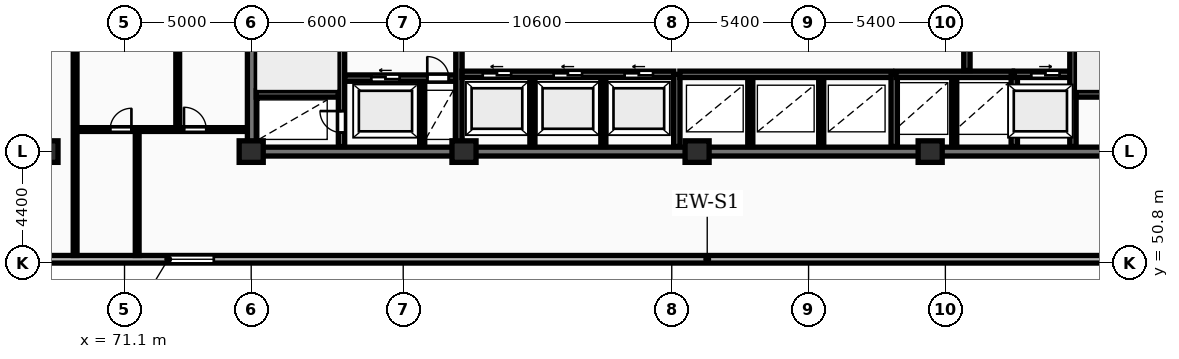
"""IFC4 building model, lengths in metres.
Left out: names, types, materials, properties, quantities, classifications, styles, units other than length and angle.
Written with IfcOpenShell. Run it as: python <this file> out.ifc"""

import sys

from ifc_helpers import new_model, si_unit, direction, frame, frame_2d, origin, origin_2d, place, context, subcontext, project, spatial, rectangle, extrude, element, fill, save


model = new_model("IFC4")
c1 = context("Model", 3, precision=1e-05, world=origin(), true_north=direction((0.0, 1.0)))
c2 = subcontext(c1, "Body", "Model", "MODEL_VIEW")
j1 = project(units=[si_unit("LENGTHUNIT", "METRE"), si_unit("PLANEANGLEUNIT", "RADIAN")], contexts=[c1])
p1 = place(None, origin())
s1 = spatial("IfcSite", under=j1, at=p1, CompositionType="ELEMENT")
p2 = place(p1, origin())
s2 = spatial("IfcBuilding", under=s1, at=p2, CompositionType="ELEMENT")
p3 = place(p2, frame((0.0, 0.0, 80.8)))
s3 = spatial("IfcBuildingStorey", under=s2, at=p3, CompositionType="ELEMENT", Elevation=80.8)
for number, where, z_axis, x_axis in (
    (1, (68.0, 55.2, 0.0), (0.0, 0.0, 1.0), (1.0, 0.0, 0.0)),
    (2, (76.1, 55.2, 0.0), (0.0, 0.0, 1.0), (1.0, 0.0, 0.0)),
    (3, (84.5, 55.2, 0.0), (0.0, 0.0, 1.0), (1.0, 0.0, 0.0)),
    (4, (93.7, 55.2, 0.0), (0.0, 0.0, 1.0), (1.0, 0.0, 0.0)),
    (5, (102.9, 55.2, 0.0), (0.0, 0.0, 1.0), (1.0, 0.0, 0.0)),
):
    element("IfcColumn", number, at=place(p3, frame(where, z_axis=z_axis, x_axis=x_axis)), inside=s3, PredefinedType="COLUMN", context=c2, shape_type="SweptSolid", body=[
        extrude(rectangle(XDim=0.95, YDim=0.85, at=origin_2d()), origin(), (0.0, 0.0, 1.0), 3.25),
    ])
p4 = place(p3, frame((57.6, 50.95, 0.0), z_axis=(0.0, 0.0, 1.0), x_axis=(1.0, 0.0, 0.0)))
e6 = element("IfcWall", 6, at=p4, inside=s3, PredefinedType="STANDARD", context=c2, shape_type="SweptSolid", body=[
    extrude(rectangle(XDim=73.0, YDim=0.3, at=frame_2d((36.5, 0.0))), origin(), (0.0, 0.0, 1.0), 2.97),
])
p5 = place(p4, frame((15.225, 0.0, 0.85)))
e7 = element("IfcOpeningElement", 7, at=p5, cuts=e6, PredefinedType="OPENING", context=c2, shape_type="SweptSolid", body=[
    extrude(rectangle(XDim=1.8, YDim=1.8, at=frame_2d((0.9, 0.9))), frame((0.0, 0.16, 0.0), z_axis=(0.0, -1.0, 0.0), x_axis=(1.0, 0.0, 0.0)), (0.0, 0.0, 1.0), 0.32),
])
p6 = place(p4, frame((58.575, 0.0, 0.85)))
e8 = element("IfcOpeningElement", 8, at=p6, cuts=e6, PredefinedType="OPENING", context=c2, shape_type="SweptSolid", body=[
    extrude(rectangle(XDim=1.8, YDim=1.8, at=frame_2d((0.9, 0.9))), frame((0.0, 0.16, 0.0), z_axis=(0.0, -1.0, 0.0), x_axis=(1.0, 0.0, 0.0)), (0.0, 0.0, 1.0), 0.32),
])
p7 = place(p3, frame((75.95, 55.2, 0.0), z_axis=(0.0, 0.0, 1.0), x_axis=(1.0, 0.0, 0.0)))
e9 = element("IfcWall", 9, at=p7, inside=s3, PredefinedType="SHEAR", context=c2, shape_type="SweptSolid", body=[
    extrude(rectangle(XDim=36.3, YDim=0.35, at=frame_2d((18.15, 0.0))), origin(), (0.0, 0.0, 1.0), 3.25),
])
p8 = place(p3, frame((76.125, 55.375, 0.0), z_axis=(0.0, 0.0, 1.0), x_axis=(0.0, 1.0, 0.0)))
e10 = element("IfcWall", 10, at=p8, inside=s3, PredefinedType="SHEAR", context=c2, shape_type="SweptSolid", body=[
    extrude(rectangle(XDim=11.65, YDim=0.35, at=frame_2d((5.825, 0.0))), origin(), (0.0, 0.0, 1.0), 3.25),
])
p9 = place(p3, frame((79.665, 55.4, 0.0), z_axis=(0.0, 0.0, 1.0), x_axis=(0.0, 1.0, 0.0)))
e11 = element("IfcWall", 11, at=p9, inside=s3, PredefinedType="SHEAR", context=c2, shape_type="SweptSolid", body=[
    extrude(rectangle(XDim=11.6, YDim=0.25, at=frame_2d((5.8, 0.0))), origin(), (0.0, 0.0, 1.0), 3.25),
])
p10 = place(p9, frame((0.55, 0.0, 0.0)))
e12 = element("IfcOpeningElement", 12, at=p10, cuts=e11, PredefinedType="OPENING", context=c2, shape_type="SweptSolid", body=[
    extrude(rectangle(XDim=0.85, YDim=2.05, at=frame_2d((0.425, 1.025))), frame((0.0, 0.135, 0.0), z_axis=(0.0, -1.0, 0.0), x_axis=(1.0, 0.0, 0.0)), (0.0, 0.0, 1.0), 0.27),
])
p11 = place(p9, frame((8.4, 0.0, 0.0)))
e13 = element("IfcOpeningElement", 13, at=p11, cuts=e11, PredefinedType="OPENING", context=c2, shape_type="SweptSolid", body=[
    extrude(rectangle(XDim=1.1, YDim=2.1, at=frame_2d((0.55, 1.05))), frame((0.0, 0.135, 0.0), z_axis=(0.0, -1.0, 0.0), x_axis=(1.0, 0.0, 0.0)), (0.0, 0.0, 1.0), 0.27),
])
p12 = place(p9, frame((10.25, 0.0, 0.0)))
e14 = element("IfcOpeningElement", 14, at=p12, cuts=e11, PredefinedType="OPENING", context=c2, shape_type="SweptSolid", body=[
    extrude(rectangle(XDim=0.85, YDim=2.05, at=frame_2d((0.425, 1.025))), frame((0.0, 0.135, 0.0), z_axis=(0.0, -1.0, 0.0), x_axis=(1.0, 0.0, 0.0)), (0.0, 0.0, 1.0), 0.27),
])
p13 = place(p3, frame((76.3, 57.475, 0.0), z_axis=(0.0, 0.0, 1.0), x_axis=(1.0, 0.0, 0.0)))
e15 = element("IfcWall", 15, at=p13, inside=s3, PredefinedType="SHEAR", context=c2, shape_type="SweptSolid", body=[
    extrude(rectangle(XDim=3.24, YDim=0.25, at=frame_2d((1.62, 0.0))), origin(), (0.0, 0.0, 1.0), 3.25),
])
p14 = place(p3, frame((79.79, 58.1, 0.0), z_axis=(0.0, 0.0, 1.0), x_axis=(1.0, 0.0, 0.0)))
e16 = element("IfcWall", 16, at=p14, inside=s3, PredefinedType="SHEAR", context=c2, shape_type="SweptSolid", body=[
    extrude(rectangle(XDim=4.39, YDim=0.25, at=frame_2d((2.195, 0.0))), origin(), (0.0, 0.0, 1.0), 3.25),
])
p15 = place(p14, frame((1.05, 0.0, 0.0)))
e17 = element("IfcOpeningElement", 17, at=p15, cuts=e16, PredefinedType="OPENING", context=c2, shape_type="SweptSolid", body=[
    extrude(rectangle(XDim=1.12, YDim=2.12, at=frame_2d((0.56, 1.06))), frame((0.0, 0.135, 0.0), z_axis=(0.0, -1.0, 0.0), x_axis=(1.0, 0.0, 0.0)), (0.0, 0.0, 1.0), 0.27),
])
p16 = place(p14, frame((3.26, 0.0, 0.0)))
e18 = element("IfcOpeningElement", 18, at=p16, cuts=e16, PredefinedType="OPENING", context=c2, shape_type="SweptSolid", body=[
    extrude(rectangle(XDim=0.85, YDim=2.05, at=frame_2d((0.425, 1.025))), frame((0.0, 0.135, 0.0), z_axis=(0.0, -1.0, 0.0), x_axis=(1.0, 0.0, 0.0)), (0.0, 0.0, 1.0), 0.27),
])
p17 = place(p3, frame((82.85, 55.4, 0.0), z_axis=(0.0, 0.0, 1.0), x_axis=(0.0, 1.0, 0.0)))
e19 = element("IfcWall", 19, at=p17, inside=s3, PredefinedType="PARTITIONING", context=c2, shape_type="SweptSolid", body=[
    extrude(rectangle(XDim=2.56, YDim=0.2, at=frame_2d((1.28, 0.0))), origin(), (0.0, 0.0, 1.0), 2.97),
])
p18 = place(p3, frame((84.3, 55.4, 0.0), z_axis=(0.0, 0.0, 1.0), x_axis=(0.0, 1.0, 0.0)))
e20 = element("IfcWall", 20, at=p18, inside=s3, PredefinedType="SHEAR", context=c2, shape_type="SweptSolid", body=[
    extrude(rectangle(XDim=11.6, YDim=0.25, at=frame_2d((5.8, 0.0))), origin(), (0.0, 0.0, 1.0), 3.25),
])
p19 = place(p18, frame((5.2, 0.0, 0.0)))
e21 = element("IfcOpeningElement", 21, at=p19, cuts=e20, PredefinedType="OPENING", context=c2, shape_type="SweptSolid", body=[
    extrude(rectangle(XDim=1.1, YDim=2.1, at=frame_2d((0.55, 1.05))), frame((0.0, 0.135, 0.0), z_axis=(0.0, -1.0, 0.0), x_axis=(1.0, 0.0, 0.0)), (0.0, 0.0, 1.0), 0.27),
])
for number, where, z_axis, x_axis in (
    (22, (87.2, 55.4, 0.0), (0.0, 0.0, 1.0), (0.0, 1.0, 0.0)),
    (23, (90.0, 55.4, 0.0), (0.0, 0.0, 1.0), (0.0, 1.0, 0.0)),
):
    element("IfcWall", number, at=place(p3, frame(where, z_axis=z_axis, x_axis=x_axis)), inside=s3, PredefinedType="PARTITIONING", context=c2, shape_type="SweptSolid", body=[
        extrude(rectangle(XDim=2.72, YDim=0.2, at=frame_2d((1.36, 0.0))), origin(), (0.0, 0.0, 1.0), 2.97),
    ])
p20 = place(p3, frame((84.42, 58.25, 0.0), z_axis=(0.0, 0.0, 1.0), x_axis=(1.0, 0.0, 0.0)))
e24 = element("IfcWall", 24, at=p20, inside=s3, PredefinedType="SHEAR", context=c2, shape_type="SweptSolid", body=[
    extrude(rectangle(XDim=8.36, YDim=0.25, at=frame_2d((4.18, 0.0))), origin(), (0.0, 0.0, 1.0), 3.25),
])
p21 = place(p20, frame((0.82, 0.0, 0.0)))
e25 = element("IfcOpeningElement", 25, at=p21, cuts=e24, PredefinedType="OPENING", context=c2, shape_type="SweptSolid", body=[
    extrude(rectangle(XDim=1.12, YDim=2.12, at=frame_2d((0.56, 1.06))), frame((0.0, 0.135, 0.0), z_axis=(0.0, -1.0, 0.0), x_axis=(1.0, 0.0, 0.0)), (0.0, 0.0, 1.0), 0.27),
])
p22 = place(p20, frame((3.62, 0.0, 0.0)))
e26 = element("IfcOpeningElement", 26, at=p22, cuts=e24, PredefinedType="OPENING", context=c2, shape_type="SweptSolid", body=[
    extrude(rectangle(XDim=1.12, YDim=2.12, at=frame_2d((0.56, 1.06))), frame((0.0, 0.135, 0.0), z_axis=(0.0, -1.0, 0.0), x_axis=(1.0, 0.0, 0.0)), (0.0, 0.0, 1.0), 0.27),
])
p23 = place(p20, frame((6.42, 0.0, 0.0)))
e27 = element("IfcOpeningElement", 27, at=p23, cuts=e24, PredefinedType="OPENING", context=c2, shape_type="SweptSolid", body=[
    extrude(rectangle(XDim=1.12, YDim=2.12, at=frame_2d((0.56, 1.06))), frame((0.0, 0.135, 0.0), z_axis=(0.0, -1.0, 0.0), x_axis=(1.0, 0.0, 0.0)), (0.0, 0.0, 1.0), 0.27),
])
p24 = place(p3, frame((92.9, 55.4, 0.0), z_axis=(0.0, 0.0, 1.0), x_axis=(0.0, 1.0, 0.0)))
e28 = element("IfcWall", 28, at=p24, inside=s3, PredefinedType="SHEAR", context=c2, shape_type="SweptSolid", body=[
    extrude(rectangle(XDim=2.85, YDim=0.25, at=frame_2d((1.425, 0.0))), origin(), (0.0, 0.0, 1.0), 3.25),
])
for number, where, z_axis, x_axis in (
    (29, (95.8, 55.4, 0.0), (0.0, 0.0, 1.0), (0.0, 1.0, 0.0)),
    (30, (98.6, 55.4, 0.0), (0.0, 0.0, 1.0), (0.0, 1.0, 0.0)),
):
    element("IfcWall", number, at=place(p3, frame(where, z_axis=z_axis, x_axis=x_axis)), inside=s3, PredefinedType="PARTITIONING", context=c2, shape_type="SweptSolid", body=[
        extrude(rectangle(XDim=2.72, YDim=0.2, at=frame_2d((1.36, 0.0))), origin(), (0.0, 0.0, 1.0), 2.97),
    ])
p25 = place(p3, frame((93.02, 58.25, 0.0), z_axis=(0.0, 0.0, 1.0), x_axis=(1.0, 0.0, 0.0)))
e31 = element("IfcWall", 31, at=p25, inside=s3, PredefinedType="SHEAR", context=c2, shape_type="SweptSolid", body=[
    extrude(rectangle(XDim=8.36, YDim=0.25, at=frame_2d((4.18, 0.0))), origin(), (0.0, 0.0, 1.0), 3.25),
])
p26 = place(p3, frame((101.48, 55.4, 0.0), z_axis=(0.0, 0.0, 1.0), x_axis=(0.0, 1.0, 0.0)))
e32 = element("IfcWall", 32, at=p26, inside=s3, PredefinedType="SHEAR", context=c2, shape_type="SweptSolid", body=[
    extrude(rectangle(XDim=2.85, YDim=0.25, at=frame_2d((1.425, 0.0))), origin(), (0.0, 0.0, 1.0), 3.25),
])
p27 = place(p3, frame((103.85, 55.4, 0.0), z_axis=(0.0, 0.0, 1.0), x_axis=(0.0, 1.0, 0.0)))
e33 = element("IfcWall", 33, at=p27, inside=s3, PredefinedType="PARTITIONING", context=c2, shape_type="SweptSolid", body=[
    extrude(rectangle(XDim=2.72, YDim=0.2, at=frame_2d((1.36, 0.0))), origin(), (0.0, 0.0, 1.0), 2.97),
])
p28 = place(p3, frame((101.55, 58.25, 0.0), z_axis=(0.0, 0.0, 1.0), x_axis=(1.0, 0.0, 0.0)))
e34 = element("IfcWall", 34, at=p28, inside=s3, PredefinedType="SHEAR", context=c2, shape_type="SweptSolid", body=[
    extrude(rectangle(XDim=4.6, YDim=0.25, at=frame_2d((2.3, 0.0))), origin(), (0.0, 0.0, 1.0), 3.25),
])
p29 = place(p3, frame((106.22, 55.4, 0.0), z_axis=(0.0, 0.0, 1.0), x_axis=(0.0, 1.0, 0.0)))
e35 = element("IfcWall", 35, at=p29, inside=s3, PredefinedType="SHEAR", context=c2, shape_type="SweptSolid", body=[
    extrude(rectangle(XDim=2.85, YDim=0.25, at=frame_2d((1.425, 0.0))), origin(), (0.0, 0.0, 1.0), 3.25),
])
p30 = place(p3, frame((106.22, 58.25, 0.0), z_axis=(0.0, 0.0, 1.0), x_axis=(1.0, 0.0, 0.0)))
e36 = element("IfcWall", 36, at=p30, inside=s3, PredefinedType="SHEAR", context=c2, shape_type="SweptSolid", body=[
    extrude(rectangle(XDim=2.46, YDim=0.25, at=frame_2d((1.23, 0.0))), origin(), (0.0, 0.0, 1.0), 3.25),
])
p31 = place(p30, frame((0.67, 0.0, 0.0)))
e37 = element("IfcOpeningElement", 37, at=p31, cuts=e36, PredefinedType="OPENING", context=c2, shape_type="SweptSolid", body=[
    extrude(rectangle(XDim=1.12, YDim=2.12, at=frame_2d((0.56, 1.06))), frame((0.0, 0.135, 0.0), z_axis=(0.0, -1.0, 0.0), x_axis=(1.0, 0.0, 0.0)), (0.0, 0.0, 1.0), 0.27),
])
p32 = place(p3, frame((104.35, 58.4, 0.0), z_axis=(0.0, 0.0, 1.0), x_axis=(0.0, 1.0, 0.0)))
e38 = element("IfcWall", 38, at=p32, inside=s3, PredefinedType="SHEAR", context=c2, shape_type="SweptSolid", body=[
    extrude(rectangle(XDim=8.6, YDim=0.25, at=frame_2d((4.3, 0.0))), origin(), (0.0, 0.0, 1.0), 3.25),
])
p33 = place(p32, frame((1.8, 0.0, 0.0)))
e39 = element("IfcOpeningElement", 39, at=p33, cuts=e38, PredefinedType="OPENING", context=c2, shape_type="SweptSolid", body=[
    extrude(rectangle(XDim=1.1, YDim=2.1, at=frame_2d((0.55, 1.05))), frame((0.0, 0.135, 0.0), z_axis=(0.0, -1.0, 0.0), x_axis=(1.0, 0.0, 0.0)), (0.0, 0.0, 1.0), 0.27),
])
p34 = place(p3, frame((108.535, 55.4, 0.0), z_axis=(0.0, 0.0, 1.0), x_axis=(0.0, 1.0, 0.0)))
e40 = element("IfcWall", 40, at=p34, inside=s3, PredefinedType="SHEAR", context=c2, shape_type="SweptSolid", body=[
    extrude(rectangle(XDim=11.6, YDim=0.25, at=frame_2d((5.8, 0.0))), origin(), (0.0, 0.0, 1.0), 3.25),
])
p35 = place(p34, frame((8.2, 0.0, 0.0)))
e41 = element("IfcOpeningElement", 41, at=p35, cuts=e40, PredefinedType="OPENING", context=c2, shape_type="SweptSolid", body=[
    extrude(rectangle(XDim=1.1, YDim=2.1, at=frame_2d((0.55, 1.05))), frame((0.0, 0.135, 0.0), z_axis=(0.0, -1.0, 0.0), x_axis=(1.0, 0.0, 0.0)), (0.0, 0.0, 1.0), 0.27),
])
p36 = place(p34, frame((10.25, 0.0, 0.0)))
e42 = element("IfcOpeningElement", 42, at=p36, cuts=e40, PredefinedType="OPENING", context=c2, shape_type="SweptSolid", body=[
    extrude(rectangle(XDim=0.85, YDim=2.05, at=frame_2d((0.425, 1.025))), frame((0.0, 0.135, 0.0), z_axis=(0.0, -1.0, 0.0), x_axis=(1.0, 0.0, 0.0)), (0.0, 0.0, 1.0), 0.27),
])
p37 = place(p3, frame((108.66, 57.475, 0.0), z_axis=(0.0, 0.0, 1.0), x_axis=(1.0, 0.0, 0.0)))
e43 = element("IfcWall", 43, at=p37, inside=s3, PredefinedType="SHEAR", context=c2, shape_type="SweptSolid", body=[
    extrude(rectangle(XDim=3.24, YDim=0.25, at=frame_2d((1.62, 0.0))), origin(), (0.0, 0.0, 1.0), 3.25),
])
p38 = place(p3, frame((69.15, 51.1, 0.0), z_axis=(0.0, 0.0, 1.0), x_axis=(0.0, 1.0, 0.0)))
e44 = element("IfcWall", 44, at=p38, inside=s3, PredefinedType="PARTITIONING", context=c2, shape_type="SweptSolid", body=[
    extrude(rectangle(XDim=16.05, YDim=0.15, at=frame_2d((8.025, 0.0))), origin(), (0.0, 0.0, 1.0), 2.97),
])
p39 = place(p38, frame((11.3, 0.0, 0.0)))
e45 = element("IfcOpeningElement", 45, at=p39, cuts=e44, PredefinedType="OPENING", context=c2, shape_type="SweptSolid", body=[
    extrude(rectangle(XDim=0.88, YDim=2.06, at=frame_2d((0.44, 1.03))), frame((0.0, 0.085, 0.0), z_axis=(0.0, -1.0, 0.0), x_axis=(1.0, 0.0, 0.0)), (0.0, 0.0, 1.0), 0.17),
])
p40 = place(p3, frame((73.2, 56.07, 0.0), z_axis=(0.0, 0.0, 1.0), x_axis=(0.0, 1.0, 0.0)))
e46 = element("IfcWall", 46, at=p40, inside=s3, PredefinedType="PARTITIONING", context=c2, shape_type="SweptSolid", body=[
    extrude(rectangle(XDim=11.08, YDim=0.15, at=frame_2d((5.54, 0.0))), origin(), (0.0, 0.0, 1.0), 2.97),
])
p41 = place(p40, frame((5.08, 0.0, 0.0)))
e47 = element("IfcOpeningElement", 47, at=p41, cuts=e46, PredefinedType="OPENING", context=c2, shape_type="SweptSolid", body=[
    extrude(rectangle(XDim=0.92, YDim=2.08, at=frame_2d((0.46, 1.04))), frame((0.0, 0.085, 0.0), z_axis=(0.0, -1.0, 0.0), x_axis=(1.0, 0.0, 0.0)), (0.0, 0.0, 1.0), 0.17),
])
p42 = place(p3, frame((71.6, 51.1, 0.0), z_axis=(0.0, 0.0, 1.0), x_axis=(0.0, 1.0, 0.0)))
e48 = element("IfcWall", 48, at=p42, inside=s3, PredefinedType="PARTITIONING", context=c2, shape_type="SweptSolid", body=[
    extrude(rectangle(XDim=4.97, YDim=0.15, at=frame_2d((2.485, 0.0))), origin(), (0.0, 0.0, 1.0), 2.97),
])
p43 = place(p3, frame((69.17, 56.07, 0.0), z_axis=(0.0, 0.0, 1.0), x_axis=(1.0, 0.0, 0.0)))
e49 = element("IfcWall", 49, at=p43, inside=s3, PredefinedType="PARTITIONING", context=c2, shape_type="SweptSolid", body=[
    extrude(rectangle(XDim=6.76, YDim=0.15, at=frame_2d((3.38, 0.0))), origin(), (0.0, 0.0, 1.0), 2.97),
])
p44 = place(p43, frame((1.362, 0.0, 0.0)))
e50 = element("IfcOpeningElement", 50, at=p44, cuts=e49, PredefinedType="OPENING", context=c2, shape_type="SweptSolid", body=[
    extrude(rectangle(XDim=0.84, YDim=2.04, at=frame_2d((0.42, 1.02))), frame((0.0, 0.085, 0.0), z_axis=(0.0, -1.0, 0.0), x_axis=(1.0, 0.0, 0.0)), (0.0, 0.0, 1.0), 0.17),
])
p45 = place(p43, frame((4.277, 0.0, 0.0)))
e51 = element("IfcOpeningElement", 51, at=p45, cuts=e49, PredefinedType="OPENING", context=c2, shape_type="SweptSolid", body=[
    extrude(rectangle(XDim=0.88, YDim=2.06, at=frame_2d((0.44, 1.03))), frame((0.0, 0.085, 0.0), z_axis=(0.0, -1.0, 0.0), x_axis=(1.0, 0.0, 0.0)), (0.0, 0.0, 1.0), 0.17),
])
p46 = place(p5, origin())
e52 = element("IfcWindow", 52, at=p46, inside=s3, PartitioningType="SINGLE_PANEL", PredefinedType="WINDOW", context=c2, shape_type="SweptSolid", body=[
    extrude(rectangle(XDim=1.8, YDim=1.8, at=frame_2d((0.9, 0.9))), frame((0.0, 0.03, 0.0), z_axis=(0.0, -1.0, 0.0), x_axis=(1.0, 0.0, 0.0)), (0.0, 0.0, 1.0), 0.06),
])
fill(e7, e52)
p47 = place(p10, origin())
e53 = element("IfcDoor", 53, at=p47, inside=s3, OperationType="SINGLE_SWING_RIGHT", PredefinedType="DOOR", context=c2, shape_type="SweptSolid", body=[
    extrude(rectangle(XDim=0.85, YDim=2.05, at=frame_2d((0.425, 1.025))), frame((0.0, 0.025, 0.0), z_axis=(0.0, -1.0, 0.0), x_axis=(1.0, 0.0, 0.0)), (0.0, 0.0, 1.0), 0.05),
])
fill(e12, e53)
p48 = place(p15, origin())
e54 = element("IfcDoor", 54, at=p48, inside=s3, OperationType="SLIDING_TO_LEFT", PredefinedType="DOOR", context=c2, shape_type="SweptSolid", body=[
    extrude(rectangle(XDim=1.12, YDim=2.12, at=frame_2d((0.56, 1.06))), frame((0.0, 0.025, 0.0), z_axis=(0.0, -1.0, 0.0), x_axis=(1.0, 0.0, 0.0)), (0.0, 0.0, 1.0), 0.05),
])
fill(e17, e54)
p49 = place(p16, origin())
e55 = element("IfcDoor", 55, at=p49, inside=s3, OperationType="SINGLE_SWING_LEFT", PredefinedType="DOOR", context=c2, shape_type="SweptSolid", body=[
    extrude(rectangle(XDim=0.85, YDim=2.05, at=frame_2d((0.425, 1.025))), frame((0.0, 0.025, 0.0), z_axis=(0.0, -1.0, 0.0), x_axis=(1.0, 0.0, 0.0)), (0.0, 0.0, 1.0), 0.05),
])
fill(e18, e55)
p50 = place(p21, origin())
e56 = element("IfcDoor", 56, at=p50, inside=s3, OperationType="SLIDING_TO_LEFT", PredefinedType="DOOR", context=c2, shape_type="SweptSolid", body=[
    extrude(rectangle(XDim=1.12, YDim=2.12, at=frame_2d((0.56, 1.06))), frame((0.0, 0.025, 0.0), z_axis=(0.0, -1.0, 0.0), x_axis=(1.0, 0.0, 0.0)), (0.0, 0.0, 1.0), 0.05),
])
fill(e25, e56)
p51 = place(p22, origin())
e57 = element("IfcDoor", 57, at=p51, inside=s3, OperationType="SLIDING_TO_LEFT", PredefinedType="DOOR", context=c2, shape_type="SweptSolid", body=[
    extrude(rectangle(XDim=1.12, YDim=2.12, at=frame_2d((0.56, 1.06))), frame((0.0, 0.025, 0.0), z_axis=(0.0, -1.0, 0.0), x_axis=(1.0, 0.0, 0.0)), (0.0, 0.0, 1.0), 0.05),
])
fill(e26, e57)
p52 = place(p23, origin())
e58 = element("IfcDoor", 58, at=p52, inside=s3, OperationType="SLIDING_TO_LEFT", PredefinedType="DOOR", context=c2, shape_type="SweptSolid", body=[
    extrude(rectangle(XDim=1.12, YDim=2.12, at=frame_2d((0.56, 1.06))), frame((0.0, 0.025, 0.0), z_axis=(0.0, -1.0, 0.0), x_axis=(1.0, 0.0, 0.0)), (0.0, 0.0, 1.0), 0.05),
])
fill(e27, e58)
p53 = place(p31, origin())
e59 = element("IfcDoor", 59, at=p53, inside=s3, OperationType="SLIDING_TO_RIGHT", PredefinedType="DOOR", context=c2, shape_type="SweptSolid", body=[
    extrude(rectangle(XDim=1.12, YDim=2.12, at=frame_2d((0.56, 1.06))), frame((0.0, 0.025, 0.0), z_axis=(0.0, -1.0, 0.0), x_axis=(1.0, 0.0, 0.0)), (0.0, 0.0, 1.0), 0.05),
])
fill(e37, e59)
p54 = place(p44, origin())
e60 = element("IfcDoor", 60, at=p54, inside=s3, OperationType="SINGLE_SWING_RIGHT", PredefinedType="DOOR", context=c2, shape_type="SweptSolid", body=[
    extrude(rectangle(XDim=0.84, YDim=2.04, at=frame_2d((0.42, 1.02))), frame((0.0, 0.025, 0.0), z_axis=(0.0, -1.0, 0.0), x_axis=(1.0, 0.0, 0.0)), (0.0, 0.0, 1.0), 0.05),
])
fill(e50, e60)
p55 = place(p45, origin())
e61 = element("IfcDoor", 61, at=p55, inside=s3, OperationType="SINGLE_SWING_LEFT", PredefinedType="DOOR", context=c2, shape_type="SweptSolid", body=[
    extrude(rectangle(XDim=0.88, YDim=2.06, at=frame_2d((0.44, 1.03))), frame((0.0, 0.025, 0.0), z_axis=(0.0, -1.0, 0.0), x_axis=(1.0, 0.0, 0.0)), (0.0, 0.0, 1.0), 0.05),
])
fill(e51, e61)
save(model, sys.argv[1])
